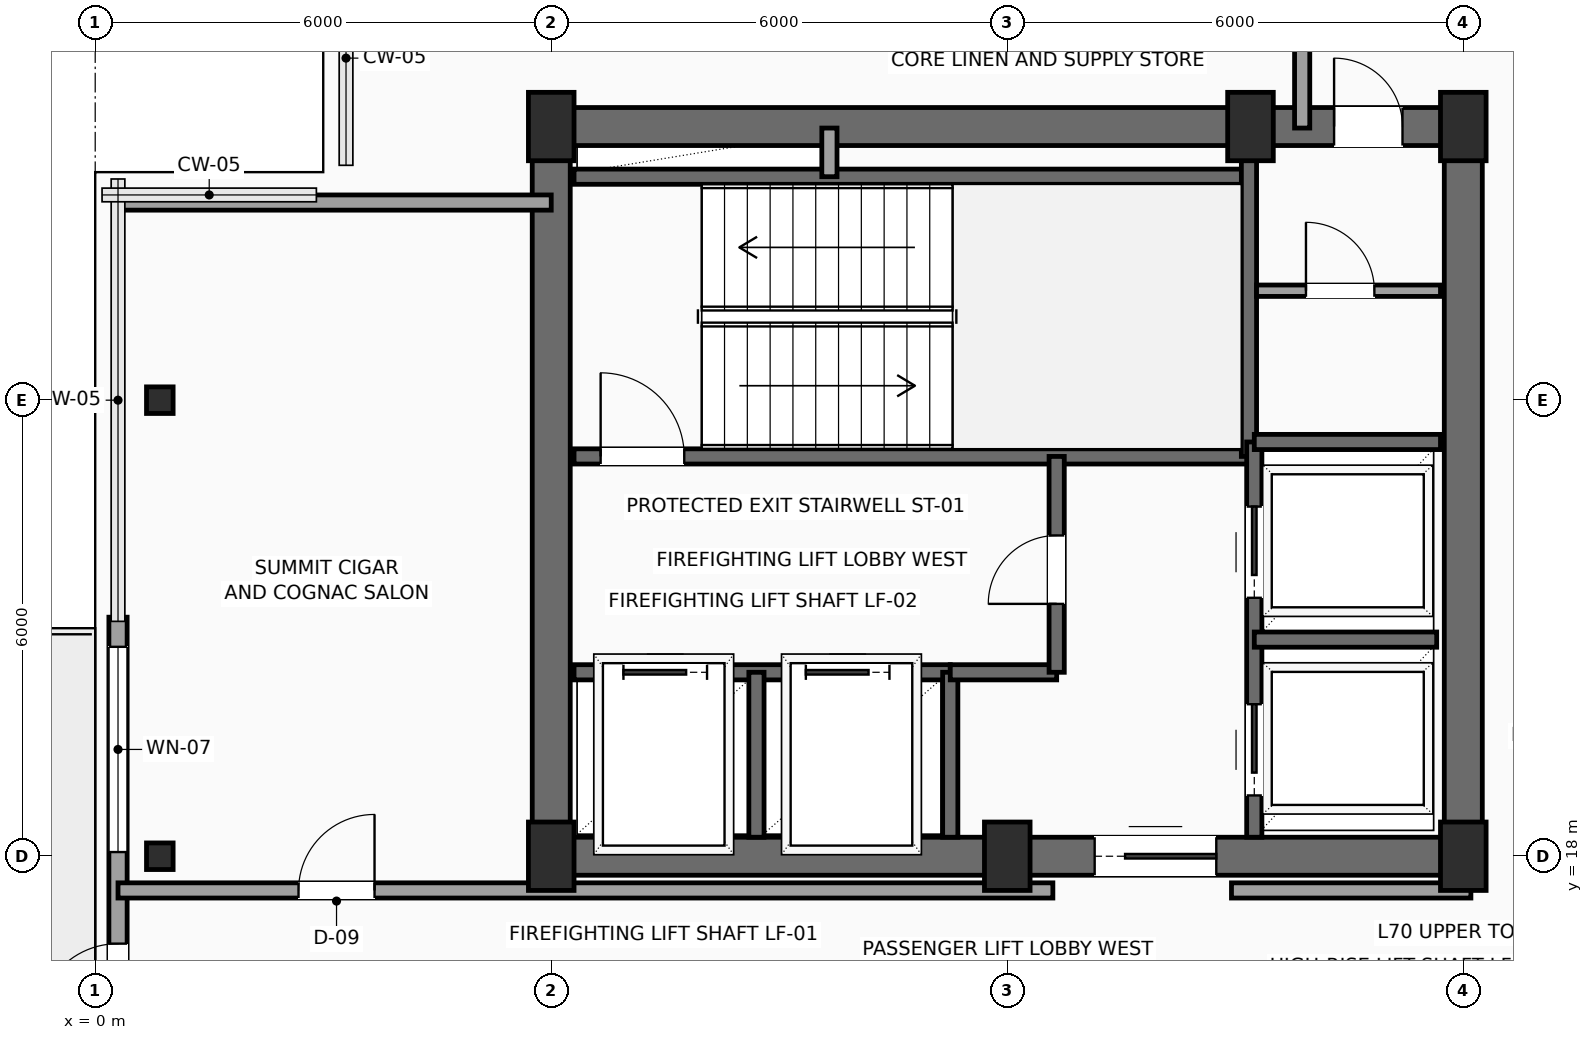
"""IFC4 building model, lengths in metres.
Left out: names, types, materials, properties, quantities, classifications, styles, units other than length and angle.
Written with IfcOpenShell. Run it as: python <this file> out.ifc"""

import sys

from ifc_helpers import new_model, si_unit, direction, frame, frame_2d, origin, origin_2d, place, context, subcontext, project, spatial, rectangle, hollow_rectangle, extrude, element, fill, save


model = new_model("IFC4")
c1 = context("Model", 3, precision=1e-05, world=origin(), true_north=direction((0.0, 1.0)))
c2 = subcontext(c1, "Body", "Model", "MODEL_VIEW")
j1 = project(units=[si_unit("LENGTHUNIT", "METRE"), si_unit("PLANEANGLEUNIT", "RADIAN")], contexts=[c1])
p1 = place(None, origin())
s1 = spatial("IfcSite", under=j1, at=p1, CompositionType="ELEMENT")
p2 = place(p1, origin())
s2 = spatial("IfcBuilding", under=s1, at=p2, CompositionType="ELEMENT")
p3 = place(p2, frame((0.0, 0.0, 278.2)))
s3 = spatial("IfcBuildingStorey", under=s2, at=p3, CompositionType="ELEMENT", Elevation=278.2)
for number, where, z_axis, x_axis in (
    (1, (6.0, 18.0, 0.0), (0.0, 0.0, 1.0), (1.0, 0.0, 0.0)),
    (2, (12.0, 18.0, 0.0), (0.0, 0.0, 1.0), (1.0, 0.0, 0.0)),
    (3, (18.0, 18.0, 0.0), (0.0, 0.0, 1.0), (1.0, 0.0, 0.0)),
    (4, (6.0, 27.6, 0.0), (0.0, 0.0, 1.0), (1.0, 0.0, 0.0)),
    (5, (15.2, 27.6, 0.0), (0.0, 0.0, 1.0), (1.0, 0.0, 0.0)),
    (6, (18.0, 27.6, 0.0), (0.0, 0.0, 1.0), (1.0, 0.0, 0.0)),
):
    element("IfcColumn", number, at=place(p3, frame(where, z_axis=z_axis, x_axis=x_axis)), inside=s3, PredefinedType="COLUMN", context=c2, shape_type="SweptSolid", body=[
        extrude(rectangle(XDim=0.6, YDim=0.9, at=origin_2d()), origin(), (0.0, 0.0, 1.0), 3.5),
    ])
for number, where, z_axis, x_axis in (
    (7, (0.85, 18.0, 0.0), (0.0, 0.0, 1.0), (1.0, 0.0, 0.0)),
    (8, (0.85, 24.0, 0.0), (0.0, 0.0, 1.0), (1.0, 0.0, 0.0)),
):
    element("IfcColumn", number, at=place(p3, frame(where, z_axis=z_axis, x_axis=x_axis)), inside=s3, PredefinedType="COLUMN", context=c2, shape_type="SweptSolid", body=[
        extrude(hollow_rectangle(XDim=0.35, YDim=0.35, WallThickness=0.016, InnerFilletRadius=0.016, OuterFilletRadius=0.032, at=origin_2d()), origin(), (0.0, 0.0, 1.0), 3.5),
    ])
p4 = place(p3, frame((0.3, 11.855, 0.0), z_axis=(0.0, 0.0, 1.0), x_axis=(0.0, 1.0, 0.0)))
e9 = element("IfcWall", 9, at=p4, inside=s3, PredefinedType="SOLIDWALL", context=c2, shape_type="SweptSolid", body=[
    extrude(rectangle(XDim=9.29, YDim=0.24, at=frame_2d((4.645, 0.0))), origin(), (0.0, 0.0, 1.0), 3.3),
])
p5 = place(p4, frame((3.945, 0.0, 0.0)))
e10 = element("IfcOpeningElement", 10, at=p5, cuts=e9, PredefinedType="OPENING", context=c2, shape_type="SweptSolid", body=[
    extrude(rectangle(XDim=1.05, YDim=2.2, at=frame_2d((0.525, 1.1))), frame((0.0, 0.13, 0.0), z_axis=(0.0, -1.0, 0.0), x_axis=(1.0, 0.0, 0.0)), (0.0, 0.0, 1.0), 0.26),
])
p6 = place(p4, frame((6.2, 0.0, 0.6)))
e11 = element("IfcOpeningElement", 11, at=p6, cuts=e9, PredefinedType="OPENING", context=c2, shape_type="SweptSolid", body=[
    extrude(rectangle(XDim=2.7, YDim=2.3, at=frame_2d((1.35, 1.15))), frame((0.0, 0.13, 0.0), z_axis=(0.0, -1.0, 0.0), x_axis=(1.0, 0.0, 0.0)), (0.0, 0.0, 1.0), 0.26),
])
p7 = place(p4, frame((0.8, 0.0, 0.6)))
e12 = element("IfcOpeningElement", 12, at=p7, cuts=e9, PredefinedType="OPENING", context=c2, shape_type="SweptSolid", body=[
    extrude(rectangle(XDim=0.9, YDim=2.2, at=frame_2d((0.45, 1.1))), frame((0.0, 0.13, 0.0), z_axis=(0.0, -1.0, 0.0), x_axis=(1.0, 0.0, 0.0)), (0.0, 0.0, 1.0), 0.26),
])
p8 = place(p3, frame((6.0, 18.0, 0.0), z_axis=(0.0, 0.0, 1.0), x_axis=(1.0, 0.0, 0.0)))
e13 = element("IfcWall", 13, at=p8, inside=s3, PredefinedType="SHEAR", context=c2, shape_type="SweptSolid", body=[
    extrude(rectangle(XDim=12.0, YDim=0.5, at=frame_2d((6.0, 0.0))), origin(), (0.0, 0.0, 1.0), 3.3),
])
p9 = place(p8, frame((7.15, 0.0, 0.0)))
e14 = element("IfcOpeningElement", 14, at=p9, cuts=e13, PredefinedType="OPENING", context=c2, shape_type="SweptSolid", body=[
    extrude(rectangle(XDim=1.6, YDim=2.3, at=frame_2d((0.8, 1.15))), frame((0.0, 0.26, 0.0), z_axis=(0.0, -1.0, 0.0), x_axis=(1.0, 0.0, 0.0)), (0.0, 0.0, 1.0), 0.52),
])
p10 = place(p3, frame((6.0, 27.6, 0.0), z_axis=(0.0, 0.0, 1.0), x_axis=(1.0, 0.0, 0.0)))
e15 = element("IfcWall", 15, at=p10, inside=s3, PredefinedType="SHEAR", context=c2, shape_type="SweptSolid", body=[
    extrude(rectangle(XDim=12.0, YDim=0.5, at=frame_2d((6.0, 0.0))), origin(), (0.0, 0.0, 1.0), 3.3),
])
p11 = place(p10, frame((10.3, 0.0, 0.0)))
e16 = element("IfcOpeningElement", 16, at=p11, cuts=e15, PredefinedType="OPENING", context=c2, shape_type="SweptSolid", body=[
    extrude(rectangle(XDim=0.9, YDim=2.15, at=frame_2d((0.45, 1.075))), frame((0.0, 0.26, 0.0), z_axis=(0.0, -1.0, 0.0), x_axis=(1.0, 0.0, 0.0)), (0.0, 0.0, 1.0), 0.52),
])
for number, where, z_axis, x_axis in (
    (17, (6.0, 18.0, 0.0), (0.0, 0.0, 1.0), (0.0, 1.0, 0.0)),
    (18, (18.0, 18.0, 0.0), (0.0, 0.0, 1.0), (0.0, 1.0, 0.0)),
):
    element("IfcWall", number, at=place(p3, frame(where, z_axis=z_axis, x_axis=x_axis)), inside=s3, PredefinedType="SHEAR", context=c2, shape_type="SweptSolid", body=[
        extrude(rectangle(XDim=9.6, YDim=0.5, at=frame_2d((4.8, 0.0))), origin(), (0.0, 0.0, 1.0), 3.3),
    ])
p12 = place(p3, frame((6.3, 23.26, 0.0), z_axis=(0.0, 0.0, 1.0), x_axis=(1.0, 0.0, 0.0)))
e19 = element("IfcWall", 19, at=p12, inside=s3, PredefinedType="SHEAR", context=c2, shape_type="SweptSolid", body=[
    extrude(rectangle(XDim=8.88, YDim=0.2, at=frame_2d((4.44, 0.0))), origin(), (0.0, 0.0, 1.0), 3.3),
])
p13 = place(p12, frame((0.35, 0.0, 0.0)))
e20 = element("IfcOpeningElement", 20, at=p13, cuts=e19, PredefinedType="OPENING", context=c2, shape_type="SweptSolid", body=[
    extrude(rectangle(XDim=1.1, YDim=2.2, at=frame_2d((0.55, 1.1))), frame((0.0, 0.11, 0.0), z_axis=(0.0, -1.0, 0.0), x_axis=(1.0, 0.0, 0.0)), (0.0, 0.0, 1.0), 0.22),
])
p14 = place(p3, frame((6.3, 26.94, 0.0), z_axis=(0.0, 0.0, 1.0), x_axis=(1.0, 0.0, 0.0)))
e21 = element("IfcWall", 21, at=p14, inside=s3, PredefinedType="SHEAR", context=c2, shape_type="SweptSolid", body=[
    extrude(rectangle(XDim=8.88, YDim=0.2, at=frame_2d((4.44, 0.0))), origin(), (0.0, 0.0, 1.0), 3.3),
])
p15 = place(p3, frame((15.18, 23.26, 0.0), z_axis=(0.0, 0.0, 1.0), x_axis=(0.0, 1.0, 0.0)))
e22 = element("IfcWall", 22, at=p15, inside=s3, PredefinedType="SHEAR", context=c2, shape_type="SweptSolid", body=[
    extrude(rectangle(XDim=4.04, YDim=0.2, at=frame_2d((2.02, 0.0))), origin(), (0.0, 0.0, 1.0), 3.3),
])
p16 = place(p3, frame((6.3, 20.42, 0.0), z_axis=(0.0, 0.0, 1.0), x_axis=(1.0, 0.0, 0.0)))
e23 = element("IfcWall", 23, at=p16, inside=s3, PredefinedType="SHEAR", context=c2, shape_type="SweptSolid", body=[
    extrude(rectangle(XDim=4.95, YDim=0.2, at=frame_2d((2.475, 0.0))), origin(), (0.0, 0.0, 1.0), 3.3),
])
p17 = place(p16, frame((0.65, 0.0, 0.0)))
e24 = element("IfcOpeningElement", 24, at=p17, cuts=e23, PredefinedType="OPENING", context=c2, shape_type="SweptSolid", body=[
    extrude(rectangle(XDim=1.1, YDim=2.2, at=frame_2d((0.55, 1.1))), frame((0.0, 0.11, 0.0), z_axis=(0.0, -1.0, 0.0), x_axis=(1.0, 0.0, 0.0)), (0.0, 0.0, 1.0), 0.22),
])
p18 = place(p16, frame((3.05, 0.0, 0.0)))
e25 = element("IfcOpeningElement", 25, at=p18, cuts=e23, PredefinedType="OPENING", context=c2, shape_type="SweptSolid", body=[
    extrude(rectangle(XDim=1.1, YDim=2.2, at=frame_2d((0.55, 1.1))), frame((0.0, 0.11, 0.0), z_axis=(0.0, -1.0, 0.0), x_axis=(1.0, 0.0, 0.0)), (0.0, 0.0, 1.0), 0.22),
])
for number, where, z_axis, x_axis in (
    (26, (8.7, 18.25, 0.0), (0.0, 0.0, 1.0), (0.0, 1.0, 0.0)),
    (27, (11.25, 18.25, 0.0), (0.0, 0.0, 1.0), (0.0, 1.0, 0.0)),
):
    element("IfcWall", number, at=place(p3, frame(where, z_axis=z_axis, x_axis=x_axis)), inside=s3, PredefinedType="SHEAR", context=c2, shape_type="SweptSolid", body=[
        extrude(rectangle(XDim=2.17, YDim=0.2, at=frame_2d((1.085, 0.0))), origin(), (0.0, 0.0, 1.0), 3.3),
    ])
p19 = place(p3, frame((11.25, 20.42, 0.0), z_axis=(0.0, 0.0, 1.0), x_axis=(1.0, 0.0, 0.0)))
e28 = element("IfcWall", 28, at=p19, inside=s3, PredefinedType="SHEAR", context=c2, shape_type="SweptSolid", body=[
    extrude(rectangle(XDim=1.4, YDim=0.2, at=frame_2d((0.7, 0.0))), origin(), (0.0, 0.0, 1.0), 3.3),
])
p20 = place(p3, frame((12.65, 20.42, 0.0), z_axis=(0.0, 0.0, 1.0), x_axis=(0.0, 1.0, 0.0)))
e29 = element("IfcWall", 29, at=p20, inside=s3, PredefinedType="SHEAR", context=c2, shape_type="SweptSolid", body=[
    extrude(rectangle(XDim=2.84, YDim=0.2, at=frame_2d((1.42, 0.0))), origin(), (0.0, 0.0, 1.0), 3.3),
])
p21 = place(p20, frame((0.9, 0.0, 0.0)))
e30 = element("IfcOpeningElement", 30, at=p21, cuts=e29, PredefinedType="OPENING", context=c2, shape_type="SweptSolid", body=[
    extrude(rectangle(XDim=0.9, YDim=2.15, at=frame_2d((0.45, 1.075))), frame((0.0, 0.11, 0.0), z_axis=(0.0, -1.0, 0.0), x_axis=(1.0, 0.0, 0.0)), (0.0, 0.0, 1.0), 0.22),
])
p22 = place(p3, frame((9.66, 26.94, 0.0), z_axis=(0.0, 0.0, 1.0), x_axis=(0.0, 1.0, 0.0)))
e31 = element("IfcWall", 31, at=p22, inside=s3, PredefinedType="SOLIDWALL", context=c2, shape_type="SweptSolid", body=[
    extrude(rectangle(XDim=0.64, YDim=0.2, at=frame_2d((0.32, 0.0))), origin(), (0.0, 0.0, 1.0), 3.3),
])
p23 = place(p3, frame((15.25, 18.25, 0.0), z_axis=(0.0, 0.0, 1.0), x_axis=(0.0, 1.0, 0.0)))
e32 = element("IfcWall", 32, at=p23, inside=s3, PredefinedType="SHEAR", context=c2, shape_type="SweptSolid", body=[
    extrude(rectangle(XDim=5.2, YDim=0.2, at=frame_2d((2.6, 0.0))), origin(), (0.0, 0.0, 1.0), 3.3),
])
p24 = place(p23, frame((0.55, 0.0, 0.0)))
e33 = element("IfcOpeningElement", 33, at=p24, cuts=e32, PredefinedType="OPENING", context=c2, shape_type="SweptSolid", body=[
    extrude(rectangle(XDim=1.2, YDim=2.2, at=frame_2d((0.6, 1.1))), frame((0.0, 0.11, 0.0), z_axis=(0.0, -1.0, 0.0), x_axis=(1.0, 0.0, 0.0)), (0.0, 0.0, 1.0), 0.22),
])
p25 = place(p23, frame((3.15, 0.0, 0.0)))
e34 = element("IfcOpeningElement", 34, at=p25, cuts=e32, PredefinedType="OPENING", context=c2, shape_type="SweptSolid", body=[
    extrude(rectangle(XDim=1.2, YDim=2.2, at=frame_2d((0.6, 1.1))), frame((0.0, 0.11, 0.0), z_axis=(0.0, -1.0, 0.0), x_axis=(1.0, 0.0, 0.0)), (0.0, 0.0, 1.0), 0.22),
])
p26 = place(p3, frame((15.25, 20.85, 0.0), z_axis=(0.0, 0.0, 1.0), x_axis=(1.0, 0.0, 0.0)))
e35 = element("IfcWall", 35, at=p26, inside=s3, PredefinedType="SHEAR", context=c2, shape_type="SweptSolid", body=[
    extrude(rectangle(XDim=2.4, YDim=0.2, at=frame_2d((1.2, 0.0))), origin(), (0.0, 0.0, 1.0), 3.3),
])
p27 = place(p3, frame((15.25, 23.45, 0.0), z_axis=(0.0, 0.0, 1.0), x_axis=(1.0, 0.0, 0.0)))
e36 = element("IfcWall", 36, at=p27, inside=s3, PredefinedType="SHEAR", context=c2, shape_type="SweptSolid", body=[
    extrude(rectangle(XDim=2.45, YDim=0.2, at=frame_2d((1.225, 0.0))), origin(), (0.0, 0.0, 1.0), 3.3),
])
p28 = place(p3, frame((15.28, 25.44, 0.0), z_axis=(0.0, 0.0, 1.0), x_axis=(1.0, 0.0, 0.0)))
e37 = element("IfcWall", 37, at=p28, inside=s3, PredefinedType="PARTITIONING", context=c2, shape_type="SweptSolid", body=[
    extrude(rectangle(XDim=2.42, YDim=0.15, at=frame_2d((1.21, 0.0))), origin(), (0.0, 0.0, 1.0), 3.3),
])
p29 = place(p28, frame((0.65, 0.0, 0.0)))
e38 = element("IfcOpeningElement", 38, at=p29, cuts=e37, PredefinedType="OPENING", context=c2, shape_type="SweptSolid", body=[
    extrude(rectangle(XDim=0.9, YDim=2.15, at=frame_2d((0.45, 1.075))), frame((0.0, 0.085, 0.0), z_axis=(0.0, -1.0, 0.0), x_axis=(1.0, 0.0, 0.0)), (0.0, 0.0, 1.0), 0.17),
])
p30 = place(p3, frame((0.3, 17.55, 0.0), z_axis=(0.0, 0.0, 1.0), x_axis=(1.0, 0.0, 0.0)))
e39 = element("IfcWall", 39, at=p30, inside=s3, PredefinedType="SOLIDWALL", context=c2, shape_type="SweptSolid", body=[
    extrude(rectangle(XDim=12.3, YDim=0.2, at=frame_2d((6.15, 0.0))), origin(), (0.0, 0.0, 1.0), 3.3),
])
p31 = place(p30, frame((2.375, 0.0, 0.0)))
e40 = element("IfcOpeningElement", 40, at=p31, cuts=e39, PredefinedType="OPENING", context=c2, shape_type="SweptSolid", body=[
    extrude(rectangle(XDim=1.0, YDim=2.2, at=frame_2d((0.5, 1.1))), frame((0.0, 0.11, 0.0), z_axis=(0.0, -1.0, 0.0), x_axis=(1.0, 0.0, 0.0)), (0.0, 0.0, 1.0), 0.22),
])
p32 = place(p3, frame((14.95, 17.55, 0.0), z_axis=(0.0, 0.0, 1.0), x_axis=(1.0, 0.0, 0.0)))
e41 = element("IfcWall", 41, at=p32, inside=s3, PredefinedType="SOLIDWALL", context=c2, shape_type="SweptSolid", body=[
    extrude(rectangle(XDim=3.15, YDim=0.2, at=frame_2d((1.575, 0.0))), origin(), (0.0, 0.0, 1.0), 3.3),
])
p33 = place(p3, frame((15.88, 27.58, 0.0), z_axis=(0.0, 0.0, 1.0), x_axis=(0.0, 1.0, 0.0)))
e42 = element("IfcWall", 42, at=p33, inside=s3, PredefinedType="SOLIDWALL", context=c2, shape_type="SweptSolid", body=[
    extrude(rectangle(XDim=2.12, YDim=0.2, at=frame_2d((1.06, 0.0))), origin(), (0.0, 0.0, 1.0), 3.3),
])
p34 = place(p3, frame((0.3, 26.6, 0.0), z_axis=(0.0, 0.0, 1.0), x_axis=(1.0, 0.0, 0.0)))
e43 = element("IfcWall", 43, at=p34, inside=s3, PredefinedType="PARTITIONING", context=c2, shape_type="SweptSolid", body=[
    extrude(rectangle(XDim=5.7, YDim=0.2, at=frame_2d((2.85, 0.0))), origin(), (0.0, 0.0, 1.0), 3.3),
])
p35 = place(p5, origin())
e44 = element("IfcDoor", 44, at=p35, inside=s3, OperationType="SINGLE_SWING_LEFT", PredefinedType="DOOR", context=c2, shape_type="SweptSolid", body=[
    extrude(rectangle(XDim=1.05, YDim=2.2, at=frame_2d((0.525, 1.1))), frame((0.0, 0.025, 0.0), z_axis=(0.0, -1.0, 0.0), x_axis=(1.0, 0.0, 0.0)), (0.0, 0.0, 1.0), 0.05),
])
fill(e10, e44)
p36 = place(p6, origin())
e45 = element("IfcWindow", 45, at=p36, inside=s3, PartitioningType="SINGLE_PANEL", PredefinedType="WINDOW", context=c2, shape_type="SweptSolid", body=[
    extrude(rectangle(XDim=2.7, YDim=2.3, at=frame_2d((1.35, 1.15))), frame((0.0, 0.03, 0.0), z_axis=(0.0, -1.0, 0.0), x_axis=(1.0, 0.0, 0.0)), (0.0, 0.0, 1.0), 0.06),
])
fill(e11, e45)
p37 = place(p9, origin())
e46 = element("IfcDoor", 46, at=p37, inside=s3, OperationType="DOUBLE_DOOR_SLIDING", PredefinedType="DOOR", context=c2, shape_type="SweptSolid", body=[
    extrude(rectangle(XDim=1.6, YDim=2.3, at=frame_2d((0.8, 1.15))), frame((0.0, 0.025, 0.0), z_axis=(0.0, -1.0, 0.0), x_axis=(1.0, 0.0, 0.0)), (0.0, 0.0, 1.0), 0.05),
])
fill(e14, e46)
p38 = place(p11, origin())
e47 = element("IfcDoor", 47, at=p38, inside=s3, OperationType="SINGLE_SWING_LEFT", PredefinedType="DOOR", context=c2, shape_type="SweptSolid", body=[
    extrude(rectangle(XDim=0.9, YDim=2.15, at=frame_2d((0.45, 1.075))), frame((0.0, 0.025, 0.0), z_axis=(0.0, -1.0, 0.0), x_axis=(1.0, 0.0, 0.0)), (0.0, 0.0, 1.0), 0.05),
])
fill(e16, e47)
p39 = place(p13, origin())
e48 = element("IfcDoor", 48, at=p39, inside=s3, OperationType="SINGLE_SWING_LEFT", PredefinedType="DOOR", context=c2, shape_type="SweptSolid", body=[
    extrude(rectangle(XDim=1.1, YDim=2.2, at=frame_2d((0.55, 1.1))), frame((0.0, 0.025, 0.0), z_axis=(0.0, -1.0, 0.0), x_axis=(1.0, 0.0, 0.0)), (0.0, 0.0, 1.0), 0.05),
])
fill(e20, e48)
p40 = place(p17, origin())
e49 = element("IfcDoor", 49, at=p40, inside=s3, OperationType="SLIDING_TO_LEFT", PredefinedType="DOOR", context=c2, shape_type="SweptSolid", body=[
    extrude(rectangle(XDim=1.1, YDim=2.2, at=frame_2d((0.55, 1.1))), frame((0.0, 0.025, 0.0), z_axis=(0.0, -1.0, 0.0), x_axis=(1.0, 0.0, 0.0)), (0.0, 0.0, 1.0), 0.05),
])
fill(e24, e49)
p41 = place(p18, origin())
e50 = element("IfcDoor", 50, at=p41, inside=s3, OperationType="SLIDING_TO_LEFT", PredefinedType="DOOR", context=c2, shape_type="SweptSolid", body=[
    extrude(rectangle(XDim=1.1, YDim=2.2, at=frame_2d((0.55, 1.1))), frame((0.0, 0.025, 0.0), z_axis=(0.0, -1.0, 0.0), x_axis=(1.0, 0.0, 0.0)), (0.0, 0.0, 1.0), 0.05),
])
fill(e25, e50)
p42 = place(p21, origin())
e51 = element("IfcDoor", 51, at=p42, inside=s3, OperationType="SINGLE_SWING_LEFT", PredefinedType="DOOR", context=c2, shape_type="SweptSolid", body=[
    extrude(rectangle(XDim=0.9, YDim=2.15, at=frame_2d((0.45, 1.075))), frame((0.0, 0.025, 0.0), z_axis=(0.0, -1.0, 0.0), x_axis=(1.0, 0.0, 0.0)), (0.0, 0.0, 1.0), 0.05),
])
fill(e30, e51)
p43 = place(p24, origin())
e52 = element("IfcDoor", 52, at=p43, inside=s3, OperationType="SLIDING_TO_RIGHT", PredefinedType="DOOR", context=c2, shape_type="SweptSolid", body=[
    extrude(rectangle(XDim=1.2, YDim=2.2, at=frame_2d((0.6, 1.1))), frame((0.0, 0.025, 0.0), z_axis=(0.0, -1.0, 0.0), x_axis=(1.0, 0.0, 0.0)), (0.0, 0.0, 1.0), 0.05),
])
fill(e33, e52)
p44 = place(p25, origin())
e53 = element("IfcDoor", 53, at=p44, inside=s3, OperationType="SLIDING_TO_RIGHT", PredefinedType="DOOR", context=c2, shape_type="SweptSolid", body=[
    extrude(rectangle(XDim=1.2, YDim=2.2, at=frame_2d((0.6, 1.1))), frame((0.0, 0.025, 0.0), z_axis=(0.0, -1.0, 0.0), x_axis=(1.0, 0.0, 0.0)), (0.0, 0.0, 1.0), 0.05),
])
fill(e34, e53)
p45 = place(p29, origin())
e54 = element("IfcDoor", 54, at=p45, inside=s3, OperationType="SINGLE_SWING_LEFT", PredefinedType="DOOR", context=c2, shape_type="SweptSolid", body=[
    extrude(rectangle(XDim=0.9, YDim=2.15, at=frame_2d((0.45, 1.075))), frame((0.0, 0.025, 0.0), z_axis=(0.0, -1.0, 0.0), x_axis=(1.0, 0.0, 0.0)), (0.0, 0.0, 1.0), 0.05),
])
fill(e38, e54)
p46 = place(p31, origin())
e55 = element("IfcDoor", 55, at=p46, inside=s3, OperationType="SINGLE_SWING_RIGHT", PredefinedType="DOOR", context=c2, shape_type="SweptSolid", body=[
    extrude(rectangle(XDim=1.0, YDim=2.2, at=frame_2d((0.5, 1.1))), frame((0.0, 0.025, 0.0), z_axis=(0.0, -1.0, 0.0), x_axis=(1.0, 0.0, 0.0)), (0.0, 0.0, 1.0), 0.05),
])
fill(e40, e55)
save(model, sys.argv[1])
